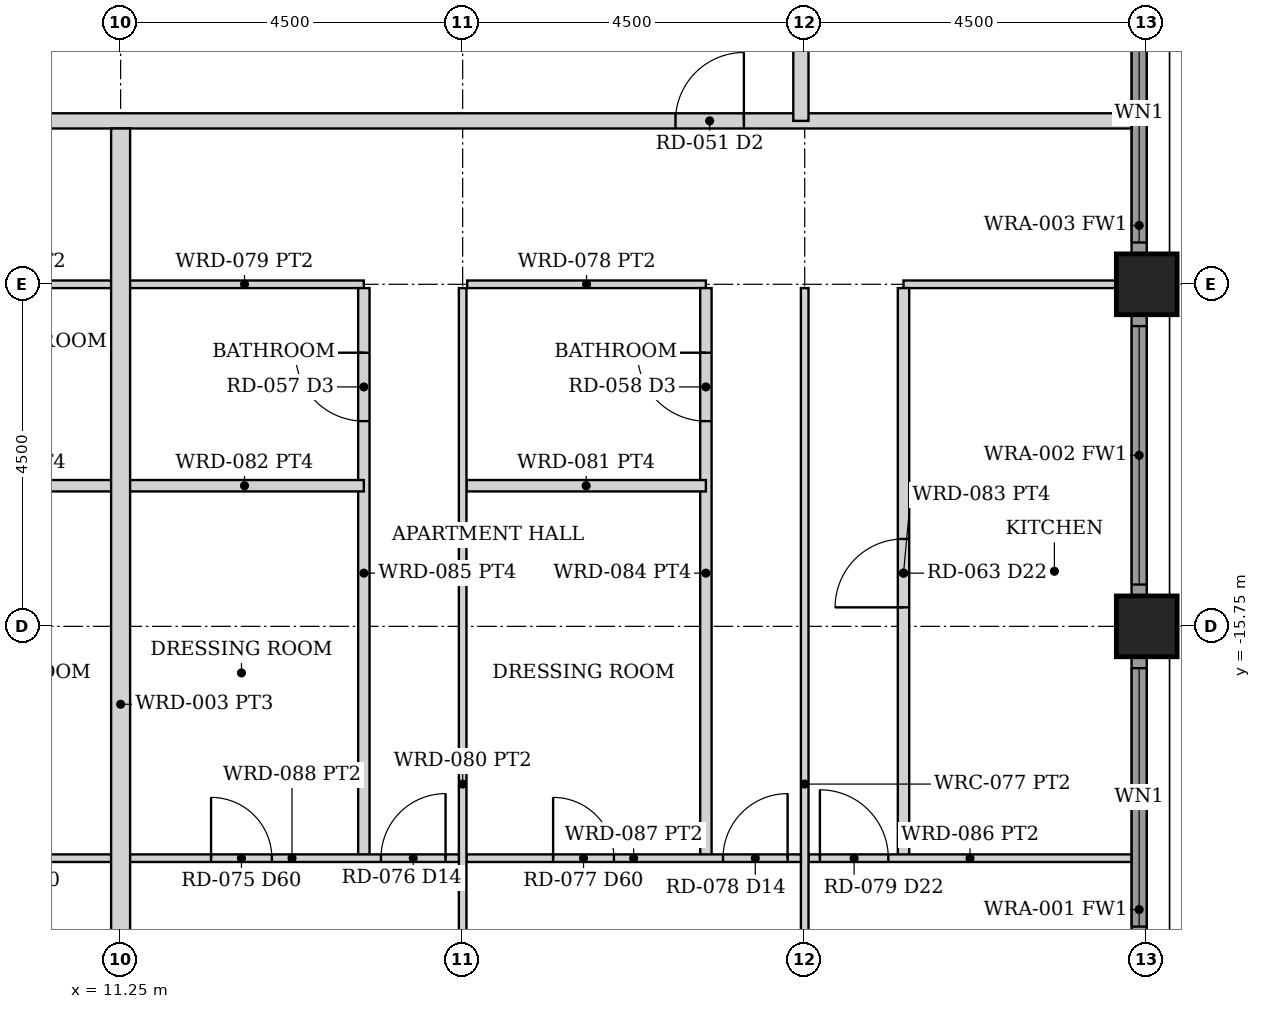
"""IFC4 building model, lengths in metres.
Left out: names, types, materials, properties, quantities, classifications, styles, units other than length and angle.
Written with IfcOpenShell. Run it as: python <this file> out.ifc"""

import sys

from ifc_helpers import new_model, si_unit, direction, frame, frame_2d, origin, origin_2d, place, context, subcontext, project, spatial, rectangle, hollow_rectangle, extrude, element, fill, save


model = new_model("IFC4")
c1 = context("Model", 3, precision=1e-05, world=origin(), true_north=direction((0.0, 1.0)))
c2 = subcontext(c1, "Body", "Model", "MODEL_VIEW")
j1 = project(units=[si_unit("LENGTHUNIT", "METRE"), si_unit("PLANEANGLEUNIT", "RADIAN")], contexts=[c1])
p1 = place(None, origin())
s1 = spatial("IfcSite", under=j1, at=p1, CompositionType="ELEMENT")
p2 = place(p1, origin())
s2 = spatial("IfcBuilding", under=s1, at=p2, CompositionType="ELEMENT")
p3 = place(p2, frame((0.0, 0.0, 58.0)))
s3 = spatial("IfcBuildingStorey", under=s2, at=p3, CompositionType="ELEMENT", Elevation=58.0)
for number, where, z_axis, x_axis in (
    (1, (24.75, -15.75, 0.0), (0.0, 0.0, 1.0), (1.0, 0.0, 0.0)),
    (2, (24.75, -11.25, 0.0), (0.0, 0.0, 1.0), (1.0, 0.0, 0.0)),
):
    element("IfcColumn", number, at=place(p3, frame(where, z_axis=z_axis, x_axis=x_axis)), inside=s3, PredefinedType="COLUMN", context=c2, shape_type="SweptSolid", body=[
        extrude(hollow_rectangle(XDim=0.8, YDim=0.8, WallThickness=0.06, at=origin_2d()), origin(), (0.0, 0.0, 1.0), 3.5),
    ])
p4 = place(p3, frame((24.65, -19.845, 0.0), z_axis=(0.0, 0.0, 1.0), x_axis=(0.0, 1.0, 0.0)))
e3 = element("IfcWall", 3, at=p4, inside=s3, PredefinedType="SOLIDWALL", context=c2, shape_type="SweptSolid", body=[
    extrude(rectangle(XDim=3.69, YDim=0.2, at=frame_2d((1.845, 0.0))), origin(), (0.0, 0.0, 1.0), 2.379),
])
p5 = place(p4, frame((0.145, 0.0, 0.3)))
e4 = element("IfcOpeningElement", 4, at=p5, cuts=e3, PredefinedType="OPENING", context=c2, shape_type="SweptSolid", body=[
    extrude(rectangle(XDim=3.4, YDim=1.929, at=frame_2d((1.7, 0.964))), frame((0.0, 0.11, 0.0), z_axis=(0.0, -1.0, 0.0), x_axis=(1.0, 0.0, 0.0)), (0.0, 0.0, 1.0), 0.22),
])
p6 = place(p3, frame((24.65, -15.345, 0.0), z_axis=(0.0, 0.0, 1.0), x_axis=(0.0, 1.0, 0.0)))
e5 = element("IfcWall", 5, at=p6, inside=s3, PredefinedType="SOLIDWALL", context=c2, shape_type="SweptSolid", body=[
    extrude(rectangle(XDim=3.69, YDim=0.2, at=frame_2d((1.845, 0.0))), origin(), (0.0, 0.0, 1.0), 2.379),
])
p7 = place(p6, frame((0.145, 0.0, 0.3)))
e6 = element("IfcOpeningElement", 6, at=p7, cuts=e5, PredefinedType="OPENING", context=c2, shape_type="SweptSolid", body=[
    extrude(rectangle(XDim=3.4, YDim=1.929, at=frame_2d((1.7, 0.964))), frame((0.0, 0.11, 0.0), z_axis=(0.0, -1.0, 0.0), x_axis=(1.0, 0.0, 0.0)), (0.0, 0.0, 1.0), 0.22),
])
p8 = place(p3, frame((24.65, -10.845, 0.0), z_axis=(0.0, 0.0, 1.0), x_axis=(0.0, 1.0, 0.0)))
e7 = element("IfcWall", 7, at=p8, inside=s3, PredefinedType="SOLIDWALL", context=c2, shape_type="SweptSolid", body=[
    extrude(rectangle(XDim=3.69, YDim=0.2, at=frame_2d((1.845, 0.0))), origin(), (0.0, 0.0, 1.0), 2.379),
])
p9 = place(p8, frame((0.145, 0.0, 0.3)))
e8 = element("IfcOpeningElement", 8, at=p9, cuts=e7, PredefinedType="OPENING", context=c2, shape_type="SweptSolid", body=[
    extrude(rectangle(XDim=3.4, YDim=1.929, at=frame_2d((1.7, 0.964))), frame((0.0, 0.11, 0.0), z_axis=(0.0, -1.0, 0.0), x_axis=(1.0, 0.0, 0.0)), (0.0, 0.0, 1.0), 0.22),
])
p10 = place(p3, frame((-24.55, -9.1, 0.0), z_axis=(0.0, 0.0, 1.0), x_axis=(1.0, 0.0, 0.0)))
e9 = element("IfcWall", 9, at=p10, inside=s3, PredefinedType="PARTITIONING", context=c2, shape_type="SweptSolid", body=[
    extrude(rectangle(XDim=49.1, YDim=0.2, at=frame_2d((24.55, 0.0))), origin(), (0.0, 0.0, 1.0), 2.373),
])
p11 = place(p10, frame((5.1, 0.0, 0.0)))
e10 = element("IfcOpeningElement", 10, at=p11, cuts=e9, PredefinedType="OPENING", context=c2, shape_type="SweptSolid", body=[
    extrude(rectangle(XDim=0.9, YDim=2.1, at=frame_2d((0.45, 1.05))), frame((0.0, 0.11, 0.0), z_axis=(0.0, -1.0, 0.0), x_axis=(1.0, 0.0, 0.0)), (0.0, 0.0, 1.0), 0.22),
])
p12 = place(p10, frame((18.1, 0.0, 0.0)))
e11 = element("IfcOpeningElement", 11, at=p12, cuts=e9, PredefinedType="OPENING", context=c2, shape_type="SweptSolid", body=[
    extrude(rectangle(XDim=0.9, YDim=2.1, at=frame_2d((0.45, 1.05))), frame((0.0, 0.11, 0.0), z_axis=(0.0, -1.0, 0.0), x_axis=(1.0, 0.0, 0.0)), (0.0, 0.0, 1.0), 0.22),
])
p13 = place(p10, frame((22.5, 0.0, 0.0)))
e12 = element("IfcOpeningElement", 12, at=p13, cuts=e9, PredefinedType="OPENING", context=c2, shape_type="SweptSolid", body=[
    extrude(rectangle(XDim=0.9, YDim=2.1, at=frame_2d((0.45, 1.05))), frame((0.0, 0.11, 0.0), z_axis=(0.0, -1.0, 0.0), x_axis=(1.0, 0.0, 0.0)), (0.0, 0.0, 1.0), 0.22),
])
p14 = place(p10, frame((27.1, 0.0, 0.0)))
e13 = element("IfcOpeningElement", 13, at=p14, cuts=e9, PredefinedType="OPENING", context=c2, shape_type="SweptSolid", body=[
    extrude(rectangle(XDim=0.9, YDim=2.1, at=frame_2d((0.45, 1.05))), frame((0.0, 0.11, 0.0), z_axis=(0.0, -1.0, 0.0), x_axis=(1.0, 0.0, 0.0)), (0.0, 0.0, 1.0), 0.22),
])
p15 = place(p10, frame((43.1, 0.0, 0.0)))
e14 = element("IfcOpeningElement", 14, at=p15, cuts=e9, PredefinedType="OPENING", context=c2, shape_type="SweptSolid", body=[
    extrude(rectangle(XDim=0.9, YDim=2.1, at=frame_2d((0.45, 1.05))), frame((0.0, 0.11, 0.0), z_axis=(0.0, -1.0, 0.0), x_axis=(1.0, 0.0, 0.0)), (0.0, 0.0, 1.0), 0.22),
])
p16 = place(p3, frame((20.2, -9.1, 0.0), z_axis=(0.0, 0.0, 1.0), x_axis=(0.0, 1.0, 0.0)))
e15 = element("IfcWall", 15, at=p16, inside=s3, PredefinedType="PARTITIONING", context=c2, shape_type="SweptSolid", body=[
    extrude(rectangle(XDim=18.2, YDim=0.2, at=frame_2d((9.1, 0.0))), origin(), (0.0, 0.0, 1.0), 2.373),
])
p17 = place(p16, frame((6.4, 0.0, 0.0)))
e16 = element("IfcOpeningElement", 16, at=p17, cuts=e15, PredefinedType="OPENING", context=c2, shape_type="SweptSolid", body=[
    extrude(rectangle(XDim=0.9, YDim=2.1, at=frame_2d((0.45, 1.05))), frame((0.0, 0.11, 0.0), z_axis=(0.0, -1.0, 0.0), x_axis=(1.0, 0.0, 0.0)), (0.0, 0.0, 1.0), 0.22),
])
p18 = place(p3, frame((8.05, -11.25, 0.0), z_axis=(0.0, 0.0, 1.0), x_axis=(1.0, 0.0, 0.0)))
e17 = element("IfcWall", 17, at=p18, inside=s3, PredefinedType="PARTITIONING", context=c2, shape_type="SweptSolid", body=[
    extrude(rectangle(XDim=3.14, YDim=0.1, at=frame_2d((1.57, 0.0))), origin(), (0.0, 0.0, 1.0), 2.373),
])
p19 = place(p3, frame((6.8, -18.8, 0.0), z_axis=(0.0, 0.0, 1.0), x_axis=(1.0, 0.0, 0.0)))
e18 = element("IfcWall", 18, at=p19, inside=s3, PredefinedType="PARTITIONING", context=c2, shape_type="SweptSolid", body=[
    extrude(rectangle(XDim=4.39, YDim=0.1, at=frame_2d((2.195, 0.0))), origin(), (0.0, 0.0, 1.0), 2.373),
])
p20 = place(p19, frame((0.175, 0.0, 0.0)))
e19 = element("IfcOpeningElement", 19, at=p20, cuts=e18, PredefinedType="OPENING", context=c2, shape_type="SweptSolid", body=[
    extrude(rectangle(XDim=0.85, YDim=2.1, at=frame_2d((0.425, 1.05))), frame((0.0, 0.06, 0.0), z_axis=(0.0, -1.0, 0.0), x_axis=(1.0, 0.0, 0.0)), (0.0, 0.0, 1.0), 0.12),
])
p21 = place(p19, frame((2.46, 0.0, 0.0)))
e20 = element("IfcOpeningElement", 20, at=p21, cuts=e18, PredefinedType="OPENING", context=c2, shape_type="SweptSolid", body=[
    extrude(rectangle(XDim=0.8, YDim=2.1, at=frame_2d((0.4, 1.05))), frame((0.0, 0.06, 0.0), z_axis=(0.0, -1.0, 0.0), x_axis=(1.0, 0.0, 0.0)), (0.0, 0.0, 1.0), 0.12),
])
p22 = place(p3, frame((8.05, -13.9, 0.0), z_axis=(0.0, 0.0, 1.0), x_axis=(1.0, 0.0, 0.0)))
e21 = element("IfcWall", 21, at=p22, inside=s3, PredefinedType="PARTITIONING", context=c2, shape_type="SweptSolid", body=[
    extrude(rectangle(XDim=3.14, YDim=0.15, at=frame_2d((1.57, 0.0))), origin(), (0.0, 0.0, 1.0), 2.373),
])
p23 = place(p3, frame((21.55, -11.25, 0.0), z_axis=(0.0, 0.0, 1.0), x_axis=(1.0, 0.0, 0.0)))
e22 = element("IfcWall", 22, at=p23, inside=s3, PredefinedType="PARTITIONING", context=c2, shape_type="SweptSolid", body=[
    extrude(rectangle(XDim=2.8, YDim=0.1, at=frame_2d((1.4, 0.0))), origin(), (0.0, 0.0, 1.0), 2.373),
])
p24 = place(p3, frame((21.55, -18.8, 0.0), z_axis=(0.0, 0.0, 1.0), x_axis=(0.0, 1.0, 0.0)))
e23 = element("IfcWall", 23, at=p24, inside=s3, PredefinedType="PARTITIONING", context=c2, shape_type="SweptSolid", body=[
    extrude(rectangle(XDim=7.5, YDim=0.15, at=frame_2d((3.75, 0.0))), origin(), (0.0, 0.0, 1.0), 2.373),
])
p25 = place(p24, frame((3.3, 0.0, 0.0)))
e24 = element("IfcOpeningElement", 24, at=p25, cuts=e23, PredefinedType="OPENING", context=c2, shape_type="SweptSolid", body=[
    extrude(rectangle(XDim=0.9, YDim=2.1, at=frame_2d((0.45, 1.05))), frame((0.0, 0.085, 0.0), z_axis=(0.0, -1.0, 0.0), x_axis=(1.0, 0.0, 0.0)), (0.0, 0.0, 1.0), 0.17),
])
p26 = place(p3, frame((20.3, -18.8, 0.0), z_axis=(0.0, 0.0, 1.0), x_axis=(1.0, 0.0, 0.0)))
e25 = element("IfcWall", 25, at=p26, inside=s3, PredefinedType="PARTITIONING", context=c2, shape_type="SweptSolid", body=[
    extrude(rectangle(XDim=4.25, YDim=0.1, at=frame_2d((2.125, 0.0))), origin(), (0.0, 0.0, 1.0), 2.373),
])
p27 = place(p26, frame((0.15, 0.0, 0.0)))
e26 = element("IfcOpeningElement", 26, at=p27, cuts=e25, PredefinedType="OPENING", context=c2, shape_type="SweptSolid", body=[
    extrude(rectangle(XDim=0.9, YDim=2.1, at=frame_2d((0.45, 1.05))), frame((0.0, 0.06, 0.0), z_axis=(0.0, -1.0, 0.0), x_axis=(1.0, 0.0, 0.0)), (0.0, 0.0, 1.0), 0.12),
])
p28 = place(p3, frame((20.25, -24.35, 0.0), z_axis=(0.0, 0.0, 1.0), x_axis=(0.0, 1.0, 0.0)))
e27 = element("IfcWall", 27, at=p28, inside=s3, PredefinedType="PARTITIONING", context=c2, shape_type="SweptSolid", body=[
    extrude(rectangle(XDim=13.05, YDim=0.1, at=frame_2d((6.525, 0.0))), origin(), (0.0, 0.0, 1.0), 2.373),
])
p29 = place(p3, frame((15.81, -11.25, 0.0), z_axis=(0.0, 0.0, 1.0), x_axis=(1.0, 0.0, 0.0)))
e28 = element("IfcWall", 28, at=p29, inside=s3, PredefinedType="PARTITIONING", context=c2, shape_type="SweptSolid", body=[
    extrude(rectangle(XDim=3.14, YDim=0.1, at=frame_2d((1.57, 0.0))), origin(), (0.0, 0.0, 1.0), 2.373),
])
p30 = place(p3, frame((18.95, -18.8, 0.0), z_axis=(0.0, 0.0, 1.0), x_axis=(0.0, 1.0, 0.0)))
e29 = element("IfcWall", 29, at=p30, inside=s3, PredefinedType="PARTITIONING", context=c2, shape_type="SweptSolid", body=[
    extrude(rectangle(XDim=7.5, YDim=0.15, at=frame_2d((3.75, 0.0))), origin(), (0.0, 0.0, 1.0), 2.373),
])
p31 = place(p30, frame((5.75, 0.0, 0.0)))
e30 = element("IfcOpeningElement", 30, at=p31, cuts=e29, PredefinedType="OPENING", context=c2, shape_type="SweptSolid", body=[
    extrude(rectangle(XDim=0.9, YDim=2.1, at=frame_2d((0.45, 1.05))), frame((0.0, 0.085, 0.0), z_axis=(0.0, -1.0, 0.0), x_axis=(1.0, 0.0, 0.0)), (0.0, 0.0, 1.0), 0.17),
])
p32 = place(p3, frame((15.8, -18.8, 0.0), z_axis=(0.0, 0.0, 1.0), x_axis=(1.0, 0.0, 0.0)))
e31 = element("IfcWall", 31, at=p32, inside=s3, PredefinedType="PARTITIONING", context=c2, shape_type="SweptSolid", body=[
    extrude(rectangle(XDim=4.4, YDim=0.1, at=frame_2d((2.2, 0.0))), origin(), (0.0, 0.0, 1.0), 2.373),
])
p33 = place(p32, frame((3.375, 0.0, 0.0)))
e32 = element("IfcOpeningElement", 32, at=p33, cuts=e31, PredefinedType="OPENING", context=c2, shape_type="SweptSolid", body=[
    extrude(rectangle(XDim=0.85, YDim=2.1, at=frame_2d((0.425, 1.05))), frame((0.0, 0.06, 0.0), z_axis=(0.0, -1.0, 0.0), x_axis=(1.0, 0.0, 0.0)), (0.0, 0.0, 1.0), 0.12),
])
p34 = place(p32, frame((1.14, 0.0, 0.0)))
e33 = element("IfcOpeningElement", 33, at=p34, cuts=e31, PredefinedType="OPENING", context=c2, shape_type="SweptSolid", body=[
    extrude(rectangle(XDim=0.8, YDim=2.1, at=frame_2d((0.4, 1.05))), frame((0.0, 0.06, 0.0), z_axis=(0.0, -1.0, 0.0), x_axis=(1.0, 0.0, 0.0)), (0.0, 0.0, 1.0), 0.12),
])
p35 = place(p3, frame((15.8, -13.9, 0.0), z_axis=(0.0, 0.0, 1.0), x_axis=(1.0, 0.0, 0.0)))
e34 = element("IfcWall", 34, at=p35, inside=s3, PredefinedType="PARTITIONING", context=c2, shape_type="SweptSolid", body=[
    extrude(rectangle(XDim=3.15, YDim=0.15, at=frame_2d((1.575, 0.0))), origin(), (0.0, 0.0, 1.0), 2.373),
])
p36 = place(p3, frame((15.75, -24.35, 0.0), z_axis=(0.0, 0.0, 1.0), x_axis=(0.0, 1.0, 0.0)))
e35 = element("IfcWall", 35, at=p36, inside=s3, PredefinedType="PARTITIONING", context=c2, shape_type="SweptSolid", body=[
    extrude(rectangle(XDim=13.05, YDim=0.1, at=frame_2d((6.525, 0.0))), origin(), (0.0, 0.0, 1.0), 2.373),
])
p37 = place(p3, frame((11.31, -11.25, 0.0), z_axis=(0.0, 0.0, 1.0), x_axis=(1.0, 0.0, 0.0)))
e36 = element("IfcWall", 36, at=p37, inside=s3, PredefinedType="PARTITIONING", context=c2, shape_type="SweptSolid", body=[
    extrude(rectangle(XDim=3.14, YDim=0.1, at=frame_2d((1.57, 0.0))), origin(), (0.0, 0.0, 1.0), 2.373),
])
p38 = place(p3, frame((14.45, -18.8, 0.0), z_axis=(0.0, 0.0, 1.0), x_axis=(0.0, 1.0, 0.0)))
e37 = element("IfcWall", 37, at=p38, inside=s3, PredefinedType="PARTITIONING", context=c2, shape_type="SweptSolid", body=[
    extrude(rectangle(XDim=7.5, YDim=0.15, at=frame_2d((3.75, 0.0))), origin(), (0.0, 0.0, 1.0), 2.373),
])
p39 = place(p38, frame((5.75, 0.0, 0.0)))
e38 = element("IfcOpeningElement", 38, at=p39, cuts=e37, PredefinedType="OPENING", context=c2, shape_type="SweptSolid", body=[
    extrude(rectangle(XDim=0.9, YDim=2.1, at=frame_2d((0.45, 1.05))), frame((0.0, 0.085, 0.0), z_axis=(0.0, -1.0, 0.0), x_axis=(1.0, 0.0, 0.0)), (0.0, 0.0, 1.0), 0.17),
])
p40 = place(p3, frame((11.31, -18.8, 0.0), z_axis=(0.0, 0.0, 1.0), x_axis=(1.0, 0.0, 0.0)))
e39 = element("IfcWall", 39, at=p40, inside=s3, PredefinedType="PARTITIONING", context=c2, shape_type="SweptSolid", body=[
    extrude(rectangle(XDim=4.39, YDim=0.1, at=frame_2d((2.195, 0.0))), origin(), (0.0, 0.0, 1.0), 2.373),
])
p41 = place(p40, frame((3.365, 0.0, 0.0)))
e40 = element("IfcOpeningElement", 40, at=p41, cuts=e39, PredefinedType="OPENING", context=c2, shape_type="SweptSolid", body=[
    extrude(rectangle(XDim=0.85, YDim=2.1, at=frame_2d((0.425, 1.05))), frame((0.0, 0.06, 0.0), z_axis=(0.0, -1.0, 0.0), x_axis=(1.0, 0.0, 0.0)), (0.0, 0.0, 1.0), 0.12),
])
p42 = place(p40, frame((1.13, 0.0, 0.0)))
e41 = element("IfcOpeningElement", 41, at=p42, cuts=e39, PredefinedType="OPENING", context=c2, shape_type="SweptSolid", body=[
    extrude(rectangle(XDim=0.8, YDim=2.1, at=frame_2d((0.4, 1.05))), frame((0.0, 0.06, 0.0), z_axis=(0.0, -1.0, 0.0), x_axis=(1.0, 0.0, 0.0)), (0.0, 0.0, 1.0), 0.12),
])
p43 = place(p3, frame((11.31, -13.9, 0.0), z_axis=(0.0, 0.0, 1.0), x_axis=(1.0, 0.0, 0.0)))
e42 = element("IfcWall", 42, at=p43, inside=s3, PredefinedType="PARTITIONING", context=c2, shape_type="SweptSolid", body=[
    extrude(rectangle(XDim=3.14, YDim=0.15, at=frame_2d((1.57, 0.0))), origin(), (0.0, 0.0, 1.0), 2.373),
])
p44 = place(p3, frame((11.25, -24.35, 0.0), z_axis=(0.0, 0.0, 1.0), x_axis=(0.0, 1.0, 0.0)))
e43 = element("IfcWall", 43, at=p44, inside=s3, PredefinedType="PARTITIONING", context=c2, shape_type="SweptSolid", body=[
    extrude(rectangle(XDim=15.15, YDim=0.25, at=frame_2d((7.575, 0.0))), origin(), (0.0, 0.0, 1.0), 2.373),
])
p45 = place(p5, origin())
e44 = element("IfcWindow", 44, at=p45, inside=s3, PartitioningType="SINGLE_PANEL", PredefinedType="WINDOW", context=c2, shape_type="SweptSolid", body=[
    extrude(rectangle(XDim=3.4, YDim=1.929, at=frame_2d((1.7, 0.964))), frame((0.0, 0.03, 0.0), z_axis=(0.0, -1.0, 0.0), x_axis=(1.0, 0.0, 0.0)), (0.0, 0.0, 1.0), 0.06),
])
fill(e4, e44)
p46 = place(p7, origin())
e45 = element("IfcWindow", 45, at=p46, inside=s3, PartitioningType="SINGLE_PANEL", PredefinedType="WINDOW", context=c2, shape_type="SweptSolid", body=[
    extrude(rectangle(XDim=3.4, YDim=1.929, at=frame_2d((1.7, 0.964))), frame((0.0, 0.03, 0.0), z_axis=(0.0, -1.0, 0.0), x_axis=(1.0, 0.0, 0.0)), (0.0, 0.0, 1.0), 0.06),
])
fill(e6, e45)
p47 = place(p9, origin())
e46 = element("IfcWindow", 46, at=p47, inside=s3, PartitioningType="SINGLE_PANEL", PredefinedType="WINDOW", context=c2, shape_type="SweptSolid", body=[
    extrude(rectangle(XDim=3.4, YDim=1.929, at=frame_2d((1.7, 0.964))), frame((0.0, 0.03, 0.0), z_axis=(0.0, -1.0, 0.0), x_axis=(1.0, 0.0, 0.0)), (0.0, 0.0, 1.0), 0.06),
])
fill(e8, e46)
p48 = place(p15, origin())
e47 = element("IfcDoor", 47, at=p48, inside=s3, OperationType="SINGLE_SWING_RIGHT", PredefinedType="DOOR", context=c2, shape_type="SweptSolid", body=[
    extrude(rectangle(XDim=0.9, YDim=2.1, at=frame_2d((0.45, 1.05))), frame((0.0, 0.025, 0.0), z_axis=(0.0, -1.0, 0.0), x_axis=(1.0, 0.0, 0.0)), (0.0, 0.0, 1.0), 0.05),
])
fill(e14, e47)
p49 = place(p25, origin())
e48 = element("IfcDoor", 48, at=p49, inside=s3, OperationType="SINGLE_SWING_LEFT", PredefinedType="DOOR", context=c2, shape_type="SweptSolid", body=[
    extrude(rectangle(XDim=0.9, YDim=2.1, at=frame_2d((0.45, 1.05))), frame((0.0, 0.025, 0.0), z_axis=(0.0, -1.0, 0.0), x_axis=(1.0, 0.0, 0.0)), (0.0, 0.0, 1.0), 0.05),
])
fill(e24, e48)
p50 = place(p27, origin())
e49 = element("IfcDoor", 49, at=p50, inside=s3, OperationType="SINGLE_SWING_LEFT", PredefinedType="DOOR", context=c2, shape_type="SweptSolid", body=[
    extrude(rectangle(XDim=0.9, YDim=2.1, at=frame_2d((0.45, 1.05))), frame((0.0, 0.025, 0.0), z_axis=(0.0, -1.0, 0.0), x_axis=(1.0, 0.0, 0.0)), (0.0, 0.0, 1.0), 0.05),
])
fill(e26, e49)
p51 = place(p33, origin())
e50 = element("IfcDoor", 50, at=p51, inside=s3, OperationType="SINGLE_SWING_RIGHT", PredefinedType="DOOR", context=c2, shape_type="SweptSolid", body=[
    extrude(rectangle(XDim=0.85, YDim=2.1, at=frame_2d((0.425, 1.05))), frame((0.0, 0.025, 0.0), z_axis=(0.0, -1.0, 0.0), x_axis=(1.0, 0.0, 0.0)), (0.0, 0.0, 1.0), 0.05),
])
fill(e32, e50)
p52 = place(p31, origin())
e51 = element("IfcDoor", 51, at=p52, inside=s3, OperationType="SINGLE_SWING_RIGHT", PredefinedType="DOOR", context=c2, shape_type="SweptSolid", body=[
    extrude(rectangle(XDim=0.9, YDim=2.1, at=frame_2d((0.45, 1.05))), frame((0.0, 0.025, 0.0), z_axis=(0.0, -1.0, 0.0), x_axis=(1.0, 0.0, 0.0)), (0.0, 0.0, 1.0), 0.05),
])
fill(e30, e51)
p53 = place(p34, origin())
e52 = element("IfcDoor", 52, at=p53, inside=s3, OperationType="SINGLE_SWING_LEFT", PredefinedType="DOOR", context=c2, shape_type="SweptSolid", body=[
    extrude(rectangle(XDim=0.8, YDim=2.1, at=frame_2d((0.4, 1.05))), frame((0.0, 0.025, 0.0), z_axis=(0.0, -1.0, 0.0), x_axis=(1.0, 0.0, 0.0)), (0.0, 0.0, 1.0), 0.05),
])
fill(e33, e52)
p54 = place(p41, origin())
e53 = element("IfcDoor", 53, at=p54, inside=s3, OperationType="SINGLE_SWING_RIGHT", PredefinedType="DOOR", context=c2, shape_type="SweptSolid", body=[
    extrude(rectangle(XDim=0.85, YDim=2.1, at=frame_2d((0.425, 1.05))), frame((0.0, 0.025, 0.0), z_axis=(0.0, -1.0, 0.0), x_axis=(1.0, 0.0, 0.0)), (0.0, 0.0, 1.0), 0.05),
])
fill(e40, e53)
p55 = place(p39, origin())
e54 = element("IfcDoor", 54, at=p55, inside=s3, OperationType="SINGLE_SWING_RIGHT", PredefinedType="DOOR", context=c2, shape_type="SweptSolid", body=[
    extrude(rectangle(XDim=0.9, YDim=2.1, at=frame_2d((0.45, 1.05))), frame((0.0, 0.025, 0.0), z_axis=(0.0, -1.0, 0.0), x_axis=(1.0, 0.0, 0.0)), (0.0, 0.0, 1.0), 0.05),
])
fill(e38, e54)
p56 = place(p42, origin())
e55 = element("IfcDoor", 55, at=p56, inside=s3, OperationType="SINGLE_SWING_LEFT", PredefinedType="DOOR", context=c2, shape_type="SweptSolid", body=[
    extrude(rectangle(XDim=0.8, YDim=2.1, at=frame_2d((0.4, 1.05))), frame((0.0, 0.025, 0.0), z_axis=(0.0, -1.0, 0.0), x_axis=(1.0, 0.0, 0.0)), (0.0, 0.0, 1.0), 0.05),
])
fill(e41, e55)
save(model, sys.argv[1])
